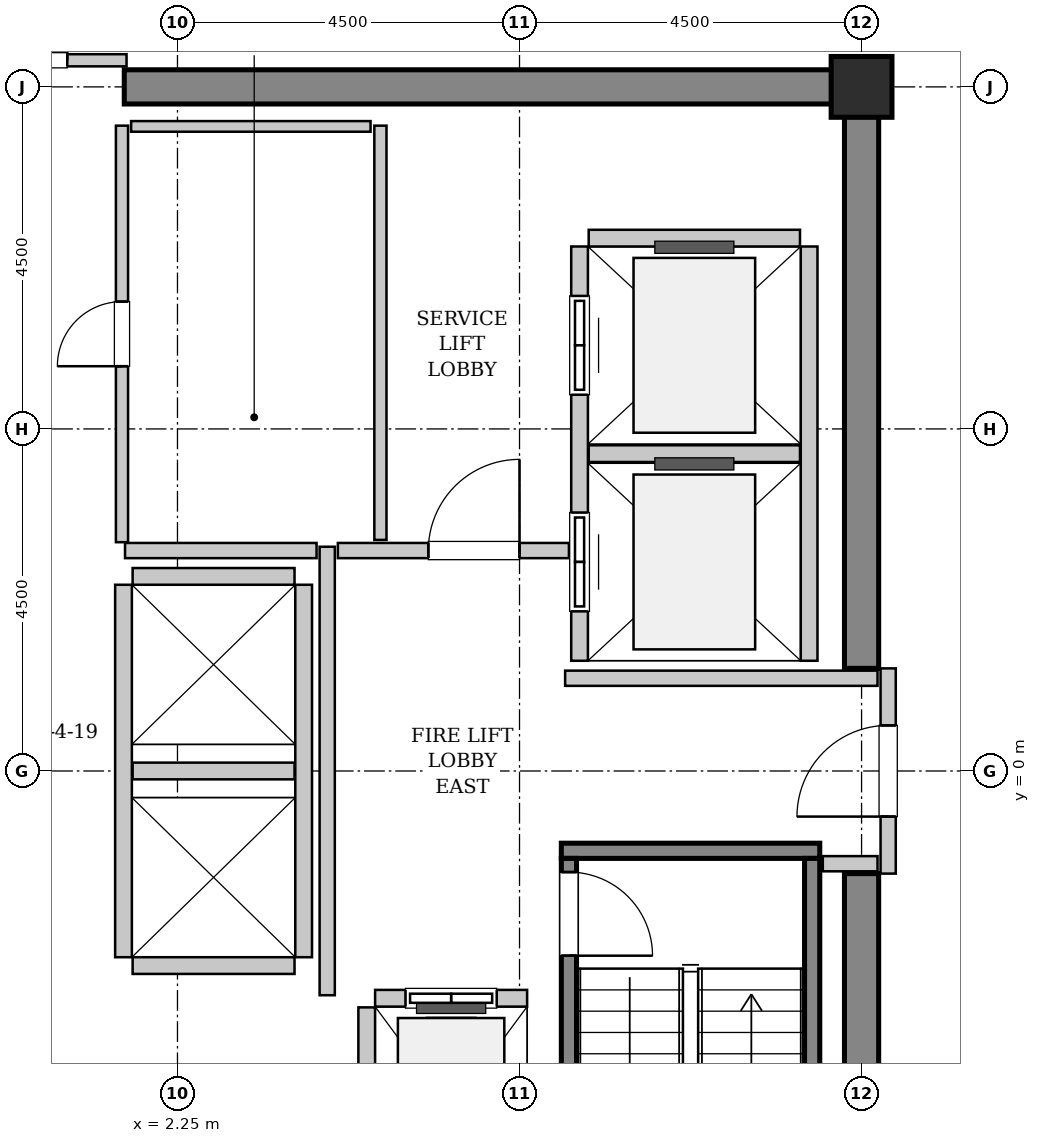
"""IFC4 building model, lengths in metres.
Left out: names, types, materials, properties, quantities, classifications, styles, units other than length and angle.
Written with IfcOpenShell. Run it as: python <this file> out.ifc"""

import sys

from ifc_helpers import new_model, si_unit, direction, frame, frame_2d, origin, origin_2d, place, context, subcontext, project, spatial, rectangle, hollow_rectangle, extrude, source, transform, mapped, element, fill, save


model = new_model("IFC4")
c1 = context("Model", 3, precision=1e-05, world=origin(), true_north=direction((0.0, 1.0)))
c2 = subcontext(c1, "Body", "Model", "MODEL_VIEW")
j1 = project(units=[si_unit("LENGTHUNIT", "METRE"), si_unit("PLANEANGLEUNIT", "RADIAN")], contexts=[c1])
p1 = place(None, origin())
s1 = spatial("IfcSite", under=j1, at=p1, CompositionType="ELEMENT")
p2 = place(p1, origin())
s2 = spatial("IfcBuilding", under=s1, at=p2, CompositionType="ELEMENT")
p3 = place(p2, frame((0.0, 0.0, 244.6)))
s3 = spatial("IfcBuildingStorey", under=s2, at=p3, CompositionType="ELEMENT", Elevation=244.6)
m1 = source(origin(), c2, "Body", "SweptSolid", [
    extrude(rectangle(XDim=9.925, YDim=0.45, at=frame_2d((4.962, 0.0))), origin(), (0.0, 0.0, 1.0), 3.8),
])
p4 = place(p3, frame((1.55, 9.0, 0.0), z_axis=(0.0, 0.0, 1.0), x_axis=(1.0, 0.0, 0.0)))
e1 = element("IfcWall", 1, at=p4, inside=s3, PredefinedType="SHEAR", context=c2, shape_type="MappedRepresentation", body=[
    mapped(m1, transform((0.0, 0.0, 0.0), x_axis=(1.0, 0.0, 0.0), y_axis=(0.0, 1.0, 0.0), z_axis=(0.0, 0.0, 1.0), scale=1.0)),
])
m2 = source(origin(), c2, "Body", "SweptSolid", [
    extrude(rectangle(XDim=7.425, YDim=0.45, at=frame_2d((3.712, 0.0))), origin(), (0.0, 0.0, 1.0), 3.8),
])
for number, where, z_axis, x_axis in (
    (2, (11.25, -8.775, 0.0), (0.0, 0.0, 1.0), (0.0, 1.0, 0.0)),
    (3, (11.25, 1.35, 0.0), (0.0, 0.0, 1.0), (0.0, 1.0, 0.0)),
):
    element("IfcWall", number, at=place(p3, frame(where, z_axis=z_axis, x_axis=x_axis)), inside=s3, PredefinedType="SHEAR", context=c2, shape_type="MappedRepresentation", body=[
        mapped(m2, transform((0.0, 0.0, 0.0), x_axis=(1.0, 0.0, 0.0), y_axis=(0.0, 1.0, 0.0), z_axis=(0.0, 0.0, 1.0), scale=1.0)),
    ])
m3 = source(origin(), c2, "Body", "SweptSolid", [
    extrude(hollow_rectangle(XDim=0.8, YDim=0.8, WallThickness=0.04, InnerFilletRadius=0.04, OuterFilletRadius=0.08, at=origin_2d()), origin(), (0.0, 0.0, 1.0), 3.8),
])
p5 = place(p3, frame((11.25, 9.0, 0.0), z_axis=(0.0, 0.0, 1.0), x_axis=(1.0, 0.0, 0.0)))
e4 = element("IfcColumn", 4, at=p5, inside=s3, PredefinedType="COLUMN", context=c2, shape_type="MappedRepresentation", body=[
    mapped(m3, transform((0.0, 0.0, 0.0), x_axis=(1.0, 0.0, 0.0), y_axis=(0.0, 1.0, 0.0), z_axis=(0.0, 0.0, 1.0), scale=1.0)),
])
m4 = source(origin(), c2, "Body", "SweptSolid", [
    extrude(rectangle(XDim=3.4, YDim=0.2, at=frame_2d((1.7, 0.0))), origin(), (0.0, 0.0, 1.0), 3.8),
])
p6 = place(p3, frame((7.3, -1.05, 0.0), z_axis=(0.0, 0.0, 1.0), x_axis=(1.0, 0.0, 0.0)))
e5 = element("IfcWall", 5, at=p6, inside=s3, PredefinedType="SOLIDWALL", context=c2, shape_type="MappedRepresentation", body=[
    mapped(m4, transform((0.0, 0.0, 0.0), x_axis=(1.0, 0.0, 0.0), y_axis=(0.0, 1.0, 0.0), z_axis=(0.0, 0.0, 1.0), scale=1.0)),
])
m5 = source(origin(), c2, "Body", "SweptSolid", [
    extrude(rectangle(XDim=7.1, YDim=0.2, at=frame_2d((3.55, 0.0))), origin(), (0.0, 0.0, 1.0), 3.8),
])
p7 = place(p3, frame((7.4, -1.15, 0.0), z_axis=(0.0, 0.0, 1.0), x_axis=(0.0, -1.0, 0.0)))
e6 = element("IfcWall", 6, at=p7, inside=s3, PredefinedType="SOLIDWALL", context=c2, shape_type="MappedRepresentation", body=[
    mapped(m5, transform((0.0, 0.0, 0.0), x_axis=(1.0, 0.0, 0.0), y_axis=(0.0, 1.0, 0.0), z_axis=(0.0, 0.0, 1.0), scale=1.0)),
])
p8 = place(p7, frame((0.18, 0.0, 0.0)))
e7 = element("IfcOpeningElement", 7, at=p8, cuts=e6, PredefinedType="OPENING", context=c2, shape_type="SweptSolid", body=[
    extrude(rectangle(XDim=1.1, YDim=2.15, at=frame_2d((0.55, 1.075))), frame((0.0, 0.11, 0.0), z_axis=(0.0, -1.0, 0.0), x_axis=(1.0, 0.0, 0.0)), (0.0, 0.0, 1.0), 0.22),
])
p9 = place(p3, frame((10.6, -1.15, 0.0), z_axis=(0.0, 0.0, 1.0), x_axis=(0.0, -1.0, 0.0)))
e8 = element("IfcWall", 8, at=p9, inside=s3, PredefinedType="SOLIDWALL", context=c2, shape_type="MappedRepresentation", body=[
    mapped(m5, transform((0.0, 0.0, 0.0), x_axis=(1.0, 0.0, 0.0), y_axis=(0.0, 1.0, 0.0), z_axis=(0.0, 0.0, 1.0), scale=1.0)),
])
m6 = source(origin(), c2, "Body", "SweptSolid", [
    extrude(rectangle(XDim=2.0, YDim=0.22, at=frame_2d((1.0, 0.0))), origin(), (0.0, 0.0, 1.0), 3.535),
])
p10 = place(p3, frame((6.85, -2.99, 0.0), z_axis=(0.0, 0.0, 1.0), x_axis=(-1.0, 0.0, 0.0)))
e9 = element("IfcWall", 9, at=p10, inside=s3, PredefinedType="SOLIDWALL", context=c2, shape_type="MappedRepresentation", body=[
    mapped(m6, transform((0.0, 0.0, 0.0), x_axis=(1.0, 0.0, 0.0), y_axis=(0.0, 1.0, 0.0), z_axis=(0.0, 0.0, 1.0), scale=1.0)),
])
p11 = place(p10, frame((0.4, 0.0, 0.0)))
e10 = element("IfcOpeningElement", 10, at=p11, cuts=e9, PredefinedType="OPENING", context=c2, shape_type="SweptSolid", body=[
    extrude(rectangle(XDim=1.2, YDim=2.2, at=frame_2d((0.6, 1.1))), frame((0.0, 0.12, 0.0), z_axis=(0.0, -1.0, 0.0), x_axis=(1.0, 0.0, 0.0)), (0.0, 0.0, 1.0), 0.24),
])
m7 = source(origin(), c2, "Body", "SweptSolid", [
    extrude(rectangle(XDim=2.68, YDim=0.22, at=frame_2d((1.34, 0.0))), origin(), (0.0, 0.0, 1.0), 3.535),
])
p12 = place(p3, frame((4.74, -3.11, 0.0), z_axis=(0.0, 0.0, 1.0), x_axis=(0.0, -1.0, 0.0)))
e11 = element("IfcWall", 11, at=p12, inside=s3, PredefinedType="SOLIDWALL", context=c2, shape_type="MappedRepresentation", body=[
    mapped(m7, transform((0.0, 0.0, 0.0), x_axis=(1.0, 0.0, 0.0), y_axis=(0.0, 1.0, 0.0), z_axis=(0.0, 0.0, 1.0), scale=1.0)),
])
m8 = source(origin(), c2, "Body", "SweptSolid", [
    extrude(rectangle(XDim=5.45, YDim=0.22, at=frame_2d((2.725, 0.0))), origin(), (0.0, 0.0, 1.0), 3.535),
])
p13 = place(p3, frame((7.54, 6.9, 0.0), z_axis=(0.0, 0.0, 1.0), x_axis=(0.0, -1.0, 0.0)))
e12 = element("IfcWall", 12, at=p13, inside=s3, PredefinedType="SOLIDWALL", context=c2, shape_type="MappedRepresentation", body=[
    mapped(m8, transform((0.0, 0.0, 0.0), x_axis=(1.0, 0.0, 0.0), y_axis=(0.0, 1.0, 0.0), z_axis=(0.0, 0.0, 1.0), scale=1.0)),
])
p14 = place(p13, frame((3.5, 0.0, 0.0)))
e13 = element("IfcOpeningElement", 13, at=p14, cuts=e12, PredefinedType="OPENING", context=c2, shape_type="SweptSolid", body=[
    extrude(rectangle(XDim=1.3, YDim=2.3, at=frame_2d((0.65, 1.15))), frame((0.0, 0.12, 0.0), z_axis=(0.0, -1.0, 0.0), x_axis=(1.0, 0.0, 0.0)), (0.0, 0.0, 1.0), 0.24),
])
p15 = place(p13, frame((0.65, 0.0, 0.0)))
e14 = element("IfcOpeningElement", 14, at=p15, cuts=e12, PredefinedType="OPENING", context=c2, shape_type="SweptSolid", body=[
    extrude(rectangle(XDim=1.3, YDim=2.3, at=frame_2d((0.65, 1.15))), frame((0.0, 0.12, 0.0), z_axis=(0.0, -1.0, 0.0), x_axis=(1.0, 0.0, 0.0)), (0.0, 0.0, 1.0), 0.24),
])
p16 = place(p3, frame((10.56, 1.45, 0.0), z_axis=(0.0, 0.0, 1.0), x_axis=(0.0, 1.0, 0.0)))
e15 = element("IfcWall", 15, at=p16, inside=s3, PredefinedType="SOLIDWALL", context=c2, shape_type="MappedRepresentation", body=[
    mapped(m8, transform((0.0, 0.0, 0.0), x_axis=(1.0, 0.0, 0.0), y_axis=(0.0, 1.0, 0.0), z_axis=(0.0, 0.0, 1.0), scale=1.0)),
])
m9 = source(origin(), c2, "Body", "SweptSolid", [
    extrude(rectangle(XDim=2.78, YDim=0.22, at=frame_2d((1.39, 0.0))), origin(), (0.0, 0.0, 1.0), 3.535),
])
for number, where, z_axis, x_axis in (
    (16, (7.66, 4.175, 0.0), (0.0, 0.0, 1.0), (1.0, 0.0, 0.0)),
    (17, (10.44, 7.01, 0.0), (0.0, 0.0, 1.0), (-1.0, 0.0, 0.0)),
):
    element("IfcWall", number, at=place(p3, frame(where, z_axis=z_axis, x_axis=x_axis)), inside=s3, PredefinedType="SOLIDWALL", context=c2, shape_type="MappedRepresentation", body=[
        mapped(m9, transform((0.0, 0.0, 0.0), x_axis=(1.0, 0.0, 0.0), y_axis=(0.0, 1.0, 0.0), z_axis=(0.0, 0.0, 1.0), scale=1.0)),
    ])
m10 = source(origin(), c2, "Body", "SweptSolid", [
    extrude(rectangle(XDim=4.9, YDim=0.22, at=frame_2d((2.45, 0.0))), origin(), (0.0, 0.0, 1.0), 3.535),
])
for number, where, z_axis, x_axis in (
    (18, (1.54, 2.45, 0.0), (0.0, 0.0, 1.0), (0.0, -1.0, 0.0)),
    (19, (3.91, -2.45, 0.0), (0.0, 0.0, 1.0), (0.0, 1.0, 0.0)),
):
    element("IfcWall", number, at=place(p3, frame(where, z_axis=z_axis, x_axis=x_axis)), inside=s3, PredefinedType="SOLIDWALL", context=c2, shape_type="MappedRepresentation", body=[
        mapped(m10, transform((0.0, 0.0, 0.0), x_axis=(1.0, 0.0, 0.0), y_axis=(0.0, 1.0, 0.0), z_axis=(0.0, 0.0, 1.0), scale=1.0)),
    ])
m11 = source(origin(), c2, "Body", "SweptSolid", [
    extrude(rectangle(XDim=2.13, YDim=0.22, at=frame_2d((1.065, 0.0))), origin(), (0.0, 0.0, 1.0), 3.535),
])
for number, where, z_axis, x_axis in (
    (20, (1.66, -2.56, 0.0), (0.0, 0.0, 1.0), (1.0, 0.0, 0.0)),
    (21, (1.66, 0.0, 0.0), (0.0, 0.0, 1.0), (1.0, 0.0, 0.0)),
    (22, (3.79, 2.56, 0.0), (0.0, 0.0, 1.0), (-1.0, 0.0, 0.0)),
):
    element("IfcWall", number, at=place(p3, frame(where, z_axis=z_axis, x_axis=x_axis)), inside=s3, PredefinedType="SOLIDWALL", context=c2, shape_type="MappedRepresentation", body=[
        mapped(m11, transform((0.0, 0.0, 0.0), x_axis=(1.0, 0.0, 0.0), y_axis=(0.0, 1.0, 0.0), z_axis=(0.0, 0.0, 1.0), scale=1.0)),
    ])
m12 = source(origin(), c2, "Body", "SweptSolid", [
    extrude(rectangle(XDim=2.7, YDim=0.2, at=frame_2d((1.35, 0.0))), origin(), (0.0, 0.0, 1.0), 2.625),
])
p17 = place(p3, frame((11.6, -1.35, 0.0), z_axis=(0.0, 0.0, 1.0), x_axis=(0.0, 1.0, 0.0)))
e23 = element("IfcWall", 23, at=p17, inside=s3, PredefinedType="PARTITIONING", context=c2, shape_type="MappedRepresentation", body=[
    mapped(m12, transform((0.0, 0.0, 0.0), x_axis=(1.0, 0.0, 0.0), y_axis=(0.0, 1.0, 0.0), z_axis=(0.0, 0.0, 1.0), scale=1.0)),
])
p18 = place(p17, frame((0.75, 0.0, 0.0)))
e24 = element("IfcOpeningElement", 24, at=p18, cuts=e23, PredefinedType="OPENING", context=c2, shape_type="SweptSolid", body=[
    extrude(rectangle(XDim=1.2, YDim=2.15, at=frame_2d((0.6, 1.075))), frame((0.0, 0.11, 0.0), z_axis=(0.0, -1.0, 0.0), x_axis=(1.0, 0.0, 0.0)), (0.0, 0.0, 1.0), 0.22),
])
m13 = source(origin(), c2, "Body", "SweptSolid", [
    extrude(rectangle(XDim=5.9, YDim=0.2, at=frame_2d((2.95, 0.0))), origin(), (0.0, 0.0, 1.0), 3.535),
])
p19 = place(p3, frame((4.22, -2.95, 0.0), z_axis=(0.0, 0.0, 1.0), x_axis=(0.0, 1.0, 0.0)))
e25 = element("IfcWall", 25, at=p19, inside=s3, PredefinedType="PARTITIONING", context=c2, shape_type="MappedRepresentation", body=[
    mapped(m13, transform((0.0, 0.0, 0.0), x_axis=(1.0, 0.0, 0.0), y_axis=(0.0, 1.0, 0.0), z_axis=(0.0, 0.0, 1.0), scale=1.0)),
])
m14 = source(origin(), c2, "Body", "SweptSolid", [
    extrude(rectangle(XDim=2.52, YDim=0.2, at=frame_2d((1.26, 0.0))), origin(), (0.0, 0.0, 1.0), 3.535),
])
p20 = place(p3, frame((1.56, 2.9, 0.0), z_axis=(0.0, 0.0, 1.0), x_axis=(1.0, 0.0, 0.0)))
e26 = element("IfcWall", 26, at=p20, inside=s3, PredefinedType="PARTITIONING", context=c2, shape_type="MappedRepresentation", body=[
    mapped(m14, transform((0.0, 0.0, 0.0), x_axis=(1.0, 0.0, 0.0), y_axis=(0.0, 1.0, 0.0), z_axis=(0.0, 0.0, 1.0), scale=1.0)),
])
m15 = source(origin(), c2, "Body", "SweptSolid", [
    extrude(rectangle(XDim=3.04, YDim=0.2, at=frame_2d((1.52, 0.0))), origin(), (0.0, 0.0, 1.0), 3.535),
])
p21 = place(p3, frame((4.36, 2.9, 0.0), z_axis=(0.0, 0.0, 1.0), x_axis=(1.0, 0.0, 0.0)))
e27 = element("IfcWall", 27, at=p21, inside=s3, PredefinedType="PARTITIONING", context=c2, shape_type="MappedRepresentation", body=[
    mapped(m15, transform((0.0, 0.0, 0.0), x_axis=(1.0, 0.0, 0.0), y_axis=(0.0, 1.0, 0.0), z_axis=(0.0, 0.0, 1.0), scale=1.0)),
])
p22 = place(p21, frame((1.19, 0.0, 0.0)))
e28 = element("IfcOpeningElement", 28, at=p22, cuts=e27, PredefinedType="OPENING", context=c2, shape_type="SweptSolid", body=[
    extrude(rectangle(XDim=1.2, YDim=2.15, at=frame_2d((0.6, 1.075))), frame((0.0, 0.11, 0.0), z_axis=(0.0, -1.0, 0.0), x_axis=(1.0, 0.0, 0.0)), (0.0, 0.0, 1.0), 0.22),
])
m16 = source(origin(), c2, "Body", "SweptSolid", [
    extrude(rectangle(XDim=4.11, YDim=0.2, at=frame_2d((2.055, 0.0))), origin(), (0.0, 0.0, 1.0), 3.535),
])
p23 = place(p3, frame((7.35, 1.22, 0.0), z_axis=(0.0, 0.0, 1.0), x_axis=(1.0, 0.0, 0.0)))
e29 = element("IfcWall", 29, at=p23, inside=s3, PredefinedType="PARTITIONING", context=c2, shape_type="MappedRepresentation", body=[
    mapped(m16, transform((0.0, 0.0, 0.0), x_axis=(1.0, 0.0, 0.0), y_axis=(0.0, 1.0, 0.0), z_axis=(0.0, 0.0, 1.0), scale=1.0)),
])
m17 = source(origin(), c2, "Body", "SweptSolid", [
    extrude(rectangle(XDim=0.72, YDim=0.2, at=frame_2d((0.36, 0.0))), origin(), (0.0, 0.0, 1.0), 3.535),
])
p24 = place(p3, frame((10.74, -1.22, 0.0), z_axis=(0.0, 0.0, 1.0), x_axis=(1.0, 0.0, 0.0)))
e30 = element("IfcWall", 30, at=p24, inside=s3, PredefinedType="PARTITIONING", context=c2, shape_type="MappedRepresentation", body=[
    mapped(m17, transform((0.0, 0.0, 0.0), x_axis=(1.0, 0.0, 0.0), y_axis=(0.0, 1.0, 0.0), z_axis=(0.0, 0.0, 1.0), scale=1.0)),
])
m18 = source(origin(), c2, "Body", "SweptSolid", [
    extrude(rectangle(XDim=3.16, YDim=0.16, at=frame_2d((1.58, 0.0))), origin(), (0.0, 0.0, 1.0), 2.625),
])
p25 = place(p3, frame((-1.58, 9.35, 0.0), z_axis=(0.0, 0.0, 1.0), x_axis=(1.0, 0.0, 0.0)))
e31 = element("IfcWall", 31, at=p25, inside=s3, PredefinedType="PARTITIONING", context=c2, shape_type="MappedRepresentation", body=[
    mapped(m18, transform((0.0, 0.0, 0.0), x_axis=(1.0, 0.0, 0.0), y_axis=(0.0, 1.0, 0.0), z_axis=(0.0, 0.0, 1.0), scale=1.0)),
])
p26 = place(p25, frame((0.78, 0.0, 0.0)))
e32 = element("IfcOpeningElement", 32, at=p26, cuts=e31, PredefinedType="OPENING", context=c2, shape_type="SweptSolid", body=[
    extrude(rectangle(XDim=1.6, YDim=2.3, at=frame_2d((0.8, 1.15))), frame((0.0, 0.09, 0.0), z_axis=(0.0, -1.0, 0.0), x_axis=(1.0, 0.0, 0.0)), (0.0, 0.0, 1.0), 0.18),
])
m19 = source(origin(), c2, "Body", "SweptSolid", [
    extrude(rectangle(XDim=5.45, YDim=0.16, at=frame_2d((2.725, 0.0))), origin(), (0.0, 0.0, 1.0), 3.535),
])
p27 = place(p3, frame((4.92, 3.04, 0.0), z_axis=(0.0, 0.0, 1.0), x_axis=(0.0, 1.0, 0.0)))
e33 = element("IfcWall", 33, at=p27, inside=s3, PredefinedType="PARTITIONING", context=c2, shape_type="MappedRepresentation", body=[
    mapped(m19, transform((0.0, 0.0, 0.0), x_axis=(1.0, 0.0, 0.0), y_axis=(0.0, 1.0, 0.0), z_axis=(0.0, 0.0, 1.0), scale=1.0)),
])
m20 = source(origin(), c2, "Body", "SweptSolid", [
    extrude(rectangle(XDim=5.48, YDim=0.16, at=frame_2d((2.74, 0.0))), origin(), (0.0, 0.0, 1.0), 3.535),
])
p28 = place(p3, frame((1.52, 3.01, 0.0), z_axis=(0.0, 0.0, 1.0), x_axis=(0.0, 1.0, 0.0)))
e34 = element("IfcWall", 34, at=p28, inside=s3, PredefinedType="PARTITIONING", context=c2, shape_type="MappedRepresentation", body=[
    mapped(m20, transform((0.0, 0.0, 0.0), x_axis=(1.0, 0.0, 0.0), y_axis=(0.0, 1.0, 0.0), z_axis=(0.0, 0.0, 1.0), scale=1.0)),
])
p29 = place(p28, frame((2.315, 0.0, 0.0)))
e35 = element("IfcOpeningElement", 35, at=p29, cuts=e34, PredefinedType="OPENING", context=c2, shape_type="SweptSolid", body=[
    extrude(rectangle(XDim=0.85, YDim=2.1, at=frame_2d((0.425, 1.05))), frame((0.0, 0.09, 0.0), z_axis=(0.0, -1.0, 0.0), x_axis=(1.0, 0.0, 0.0)), (0.0, 0.0, 1.0), 0.18),
])
m21 = source(origin(), c2, "Body", "SweptSolid", [
    extrude(rectangle(XDim=3.15, YDim=0.14, at=frame_2d((1.575, 0.0))), origin(), (0.0, 0.0, 1.0), 3.535),
])
p30 = place(p3, frame((1.64, 8.48, 0.0), z_axis=(0.0, 0.0, 1.0), x_axis=(1.0, 0.0, 0.0)))
e36 = element("IfcWall", 36, at=p30, inside=s3, PredefinedType="PARTITIONING", context=c2, shape_type="MappedRepresentation", body=[
    mapped(m21, transform((0.0, 0.0, 0.0), x_axis=(1.0, 0.0, 0.0), y_axis=(0.0, 1.0, 0.0), z_axis=(0.0, 0.0, 1.0), scale=1.0)),
])
m22 = source(origin(), c2, "Body", "SweptSolid", [
    extrude(rectangle(XDim=1.1, YDim=2.15, at=frame_2d((0.55, 1.075))), frame((0.0, 0.025, 0.0), z_axis=(0.0, -1.0, 0.0), x_axis=(1.0, 0.0, 0.0)), (0.0, 0.0, 1.0), 0.05),
])
p31 = place(p8, origin())
e37 = element("IfcDoor", 37, at=p31, inside=s3, OperationType="SINGLE_SWING_RIGHT", PredefinedType="DOOR", context=c2, shape_type="MappedRepresentation", body=[
    mapped(m22, transform((0.0, 0.0, 0.0), x_axis=(1.0, 0.0, 0.0), y_axis=(0.0, 1.0, 0.0), z_axis=(0.0, 0.0, 1.0), scale=1.0)),
])
fill(e7, e37)
m23 = source(origin(), c2, "Body", "SweptSolid", [
    extrude(rectangle(XDim=1.2, YDim=2.2, at=frame_2d((0.6, 1.1))), frame((0.0, 0.025, 0.0), z_axis=(0.0, -1.0, 0.0), x_axis=(1.0, 0.0, 0.0)), (0.0, 0.0, 1.0), 0.05),
])
p32 = place(p11, origin())
e38 = element("IfcDoor", 38, at=p32, inside=s3, OperationType="SLIDING_TO_LEFT", PredefinedType="DOOR", context=c2, shape_type="MappedRepresentation", body=[
    mapped(m23, transform((0.0, 0.0, 0.0), x_axis=(1.0, 0.0, 0.0), y_axis=(0.0, 1.0, 0.0), z_axis=(0.0, 0.0, 1.0), scale=1.0)),
])
fill(e10, e38)
m24 = source(origin(), c2, "Body", "SweptSolid", [
    extrude(rectangle(XDim=1.3, YDim=2.3, at=frame_2d((0.65, 1.15))), frame((0.0, 0.025, 0.0), z_axis=(0.0, -1.0, 0.0), x_axis=(1.0, 0.0, 0.0)), (0.0, 0.0, 1.0), 0.05),
])
p33 = place(p14, origin())
e39 = element("IfcDoor", 39, at=p33, inside=s3, OperationType="SLIDING_TO_RIGHT", PredefinedType="DOOR", context=c2, shape_type="MappedRepresentation", body=[
    mapped(m24, transform((0.0, 0.0, 0.0), x_axis=(1.0, 0.0, 0.0), y_axis=(0.0, 1.0, 0.0), z_axis=(0.0, 0.0, 1.0), scale=1.0)),
])
fill(e13, e39)
p34 = place(p15, origin())
e40 = element("IfcDoor", 40, at=p34, inside=s3, OperationType="SLIDING_TO_RIGHT", PredefinedType="DOOR", context=c2, shape_type="MappedRepresentation", body=[
    mapped(m24, transform((0.0, 0.0, 0.0), x_axis=(1.0, 0.0, 0.0), y_axis=(0.0, 1.0, 0.0), z_axis=(0.0, 0.0, 1.0), scale=1.0)),
])
fill(e14, e40)
m25 = source(origin(), c2, "Body", "SweptSolid", [
    extrude(rectangle(XDim=1.2, YDim=2.15, at=frame_2d((0.6, 1.075))), frame((0.0, 0.025, 0.0), z_axis=(0.0, -1.0, 0.0), x_axis=(1.0, 0.0, 0.0)), (0.0, 0.0, 1.0), 0.05),
])
p35 = place(p18, origin())
e41 = element("IfcDoor", 41, at=p35, inside=s3, OperationType="SINGLE_SWING_LEFT", PredefinedType="DOOR", context=c2, shape_type="MappedRepresentation", body=[
    mapped(m25, transform((0.0, 0.0, 0.0), x_axis=(1.0, 0.0, 0.0), y_axis=(0.0, 1.0, 0.0), z_axis=(0.0, 0.0, 1.0), scale=1.0)),
])
fill(e24, e41)
p36 = place(p22, origin())
e42 = element("IfcDoor", 42, at=p36, inside=s3, OperationType="SINGLE_SWING_RIGHT", PredefinedType="DOOR", context=c2, shape_type="MappedRepresentation", body=[
    mapped(m25, transform((0.0, 0.0, 0.0), x_axis=(1.0, 0.0, 0.0), y_axis=(0.0, 1.0, 0.0), z_axis=(0.0, 0.0, 1.0), scale=1.0)),
])
fill(e28, e42)
m26 = source(origin(), c2, "Body", "SweptSolid", [
    extrude(rectangle(XDim=1.6, YDim=2.3, at=frame_2d((0.8, 1.15))), frame((0.0, 0.025, 0.0), z_axis=(0.0, -1.0, 0.0), x_axis=(1.0, 0.0, 0.0)), (0.0, 0.0, 1.0), 0.05),
])
p37 = place(p26, origin())
e43 = element("IfcDoor", 43, at=p37, inside=s3, OperationType="DOUBLE_DOOR_SINGLE_SWING", PredefinedType="DOOR", context=c2, shape_type="MappedRepresentation", body=[
    mapped(m26, transform((0.0, 0.0, 0.0), x_axis=(1.0, 0.0, 0.0), y_axis=(0.0, 1.0, 0.0), z_axis=(0.0, 0.0, 1.0), scale=1.0)),
])
fill(e32, e43)
m27 = source(origin(), c2, "Body", "SweptSolid", [
    extrude(rectangle(XDim=0.85, YDim=2.1, at=frame_2d((0.425, 1.05))), frame((0.0, 0.025, 0.0), z_axis=(0.0, -1.0, 0.0), x_axis=(1.0, 0.0, 0.0)), (0.0, 0.0, 1.0), 0.05),
])
p38 = place(p29, origin())
e44 = element("IfcDoor", 44, at=p38, inside=s3, OperationType="SINGLE_SWING_LEFT", PredefinedType="DOOR", context=c2, shape_type="MappedRepresentation", body=[
    mapped(m27, transform((0.0, 0.0, 0.0), x_axis=(1.0, 0.0, 0.0), y_axis=(0.0, 1.0, 0.0), z_axis=(0.0, 0.0, 1.0), scale=1.0)),
])
fill(e35, e44)
save(model, sys.argv[1])
